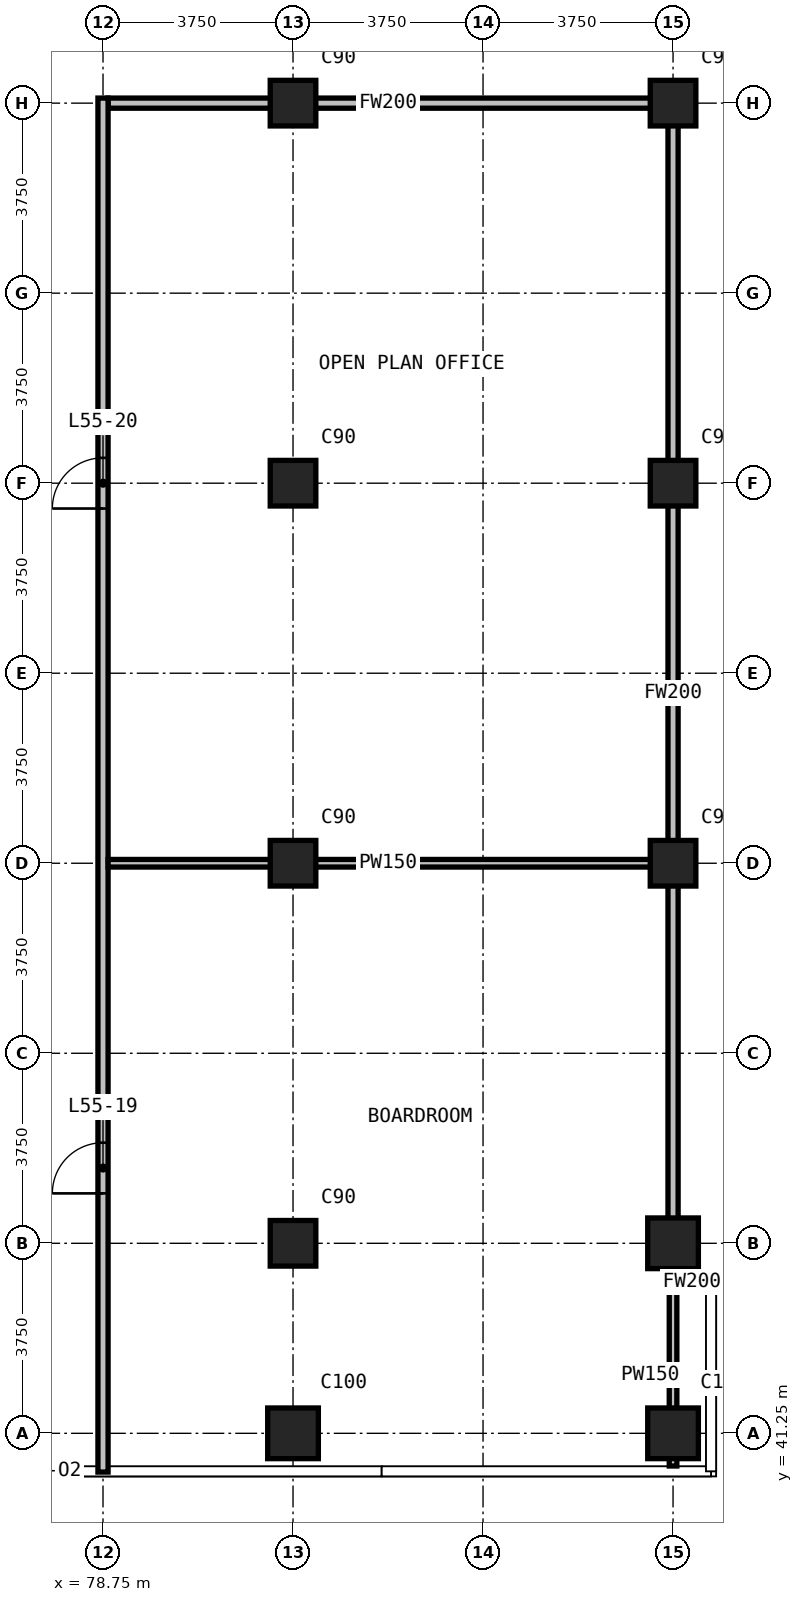
"""IFC4 building model, lengths in metres.
Left out: names, types, materials, properties, quantities, classifications, styles, units other than length and angle.
Written with IfcOpenShell. Run it as: python <this file> out.ifc"""

import sys

from ifc_helpers import new_model, si_unit, direction, frame, frame_2d, origin, origin_2d, place, context, subcontext, project, spatial, rectangle, extrude, element, fill, save


model = new_model("IFC4")
c1 = context("Model", 3, precision=1e-05, world=origin(), true_north=direction((0.0, 1.0)))
c2 = subcontext(c1, "Body", "Model", "MODEL_VIEW")
j1 = project(units=[si_unit("LENGTHUNIT", "METRE"), si_unit("PLANEANGLEUNIT", "RADIAN")], contexts=[c1])
p1 = place(None, origin())
s1 = spatial("IfcSite", under=j1, at=p1, CompositionType="ELEMENT")
p2 = place(p1, origin())
s2 = spatial("IfcBuilding", under=s1, at=p2, CompositionType="ELEMENT")
p3 = place(p2, frame((0.0, 0.0, 213.9)))
s3 = spatial("IfcBuildingStorey", under=s2, at=p3, CompositionType="ELEMENT", Elevation=213.9)
p4 = place(p3, frame((82.5, 41.25, 0.0), z_axis=(0.0, 0.0, 1.0), x_axis=(1.0, 0.0, 0.0)))
e1 = element("IfcColumn", 1, at=p4, inside=s3, PredefinedType="COLUMN", context=c2, shape_type="SweptSolid", body=[
    extrude(rectangle(XDim=1.0, YDim=1.0, at=origin_2d()), origin(), (0.0, 0.0, 1.0), 3.6),
])
for number, where, z_axis, x_axis in (
    (2, (82.5, 45.0, 0.0), (0.0, 0.0, 1.0), (1.0, 0.0, 0.0)),
    (3, (82.5, 52.5, 0.0), (0.0, 0.0, 1.0), (1.0, 0.0, 0.0)),
    (4, (82.5, 60.0, 0.0), (0.0, 0.0, 1.0), (1.0, 0.0, 0.0)),
    (5, (82.5, 67.5, 0.0), (0.0, 0.0, 1.0), (1.0, 0.0, 0.0)),
):
    element("IfcColumn", number, at=place(p3, frame(where, z_axis=z_axis, x_axis=x_axis)), inside=s3, PredefinedType="COLUMN", context=c2, shape_type="SweptSolid", body=[
        extrude(rectangle(XDim=0.9, YDim=0.9, at=origin_2d()), origin(), (0.0, 0.0, 1.0), 3.6),
    ])
for number, where, z_axis, x_axis in (
    (6, (90.0, 41.25, 0.0), (0.0, 0.0, 1.0), (1.0, 0.0, 0.0)),
    (7, (90.0, 45.0, 0.0), (0.0, 0.0, 1.0), (1.0, 0.0, 0.0)),
):
    element("IfcColumn", number, at=place(p3, frame(where, z_axis=z_axis, x_axis=x_axis)), inside=s3, PredefinedType="COLUMN", context=c2, shape_type="SweptSolid", body=[
        extrude(rectangle(XDim=1.0, YDim=1.0, at=origin_2d()), origin(), (0.0, 0.0, 1.0), 3.6),
    ])
for number, where, z_axis, x_axis in (
    (8, (90.0, 52.5, 0.0), (0.0, 0.0, 1.0), (1.0, 0.0, 0.0)),
    (9, (90.0, 60.0, 0.0), (0.0, 0.0, 1.0), (1.0, 0.0, 0.0)),
    (10, (90.0, 67.5, 0.0), (0.0, 0.0, 1.0), (1.0, 0.0, 0.0)),
):
    element("IfcColumn", number, at=place(p3, frame(where, z_axis=z_axis, x_axis=x_axis)), inside=s3, PredefinedType="COLUMN", context=c2, shape_type="SweptSolid", body=[
        extrude(rectangle(XDim=0.9, YDim=0.9, at=origin_2d()), origin(), (0.0, 0.0, 1.0), 3.6),
    ])
p5 = place(p3, frame((90.1, 44.235, 0.0), z_axis=(0.0, 0.0, 1.0), x_axis=(1.0, 0.0, 0.0)))
e11 = element("IfcWall", 11, at=p5, inside=s3, PredefinedType="PARTITIONING", context=c2, shape_type="SweptSolid", body=[
    extrude(rectangle(XDim=0.545, YDim=0.2, at=frame_2d((0.272, 0.0))), origin(), (0.0, 0.0, 1.0), 3.3),
])
p6 = place(p3, frame((78.85, 67.5, 0.0), z_axis=(0.0, 0.0, 1.0), x_axis=(1.0, 0.0, 0.0)))
e12 = element("IfcWall", 12, at=p6, inside=s3, PredefinedType="PARTITIONING", context=c2, shape_type="SweptSolid", body=[
    extrude(rectangle(XDim=11.05, YDim=0.2, at=frame_2d((5.525, 0.0))), origin(), (0.0, 0.0, 1.0), 3.3),
])
p7 = place(p3, frame((78.75, 40.485, 0.0), z_axis=(0.0, 0.0, 1.0), x_axis=(0.0, 1.0, 0.0)))
e13 = element("IfcWall", 13, at=p7, inside=s3, PredefinedType="PARTITIONING", context=c2, shape_type="SweptSolid", body=[
    extrude(rectangle(XDim=27.115, YDim=0.2, at=frame_2d((13.558, 0.0))), origin(), (0.0, 0.0, 1.0), 3.3),
])
p8 = place(p7, frame((5.5, 0.0, 0.0)))
e14 = element("IfcOpeningElement", 14, at=p8, cuts=e13, PredefinedType="OPENING", context=c2, shape_type="SweptSolid", body=[
    extrude(rectangle(XDim=1.0, YDim=2.2, at=frame_2d((0.5, 1.1))), frame((0.0, 0.11, 0.0), z_axis=(0.0, -1.0, 0.0), x_axis=(1.0, 0.0, 0.0)), (0.0, 0.0, 1.0), 0.22),
])
p9 = place(p7, frame((19.015, 0.0, 0.0)))
e15 = element("IfcOpeningElement", 15, at=p9, cuts=e13, PredefinedType="OPENING", context=c2, shape_type="SweptSolid", body=[
    extrude(rectangle(XDim=1.0, YDim=2.2, at=frame_2d((0.5, 1.1))), frame((0.0, 0.11, 0.0), z_axis=(0.0, -1.0, 0.0), x_axis=(1.0, 0.0, 0.0)), (0.0, 0.0, 1.0), 0.22),
])
p10 = place(p3, frame((90.0, 44.135, 0.0), z_axis=(0.0, 0.0, 1.0), x_axis=(0.0, 1.0, 0.0)))
e16 = element("IfcWall", 16, at=p10, inside=s3, PredefinedType="PARTITIONING", context=c2, shape_type="SweptSolid", body=[
    extrude(rectangle(XDim=23.465, YDim=0.2, at=frame_2d((11.732, 0.0))), origin(), (0.0, 0.0, 1.0), 3.3),
])
p11 = place(p3, frame((78.85, 52.5, 0.0), z_axis=(0.0, 0.0, 1.0), x_axis=(1.0, 0.0, 0.0)))
e17 = element("IfcWall", 17, at=p11, inside=s3, PredefinedType="PARTITIONING", context=c2, shape_type="SweptSolid", body=[
    extrude(rectangle(XDim=11.05, YDim=0.15, at=frame_2d((5.525, 0.0))), origin(), (0.0, 0.0, 1.0), 3.3),
])
p12 = place(p3, frame((90.0, 40.605, 0.0), z_axis=(0.0, 0.0, 1.0), x_axis=(0.0, 1.0, 0.0)))
e18 = element("IfcWall", 18, at=p12, inside=s3, PredefinedType="PARTITIONING", context=c2, shape_type="SweptSolid", body=[
    extrude(rectangle(XDim=3.6, YDim=0.15, at=frame_2d((1.8, 0.0))), origin(), (0.0, 0.0, 1.0), 3.3),
])
p13 = place(p8, origin())
e19 = element("IfcDoor", 19, at=p13, inside=s3, OperationType="SINGLE_SWING_LEFT", PredefinedType="DOOR", context=c2, shape_type="SweptSolid", body=[
    extrude(rectangle(XDim=1.0, YDim=2.2, at=frame_2d((0.5, 1.1))), frame((0.0, 0.025, 0.0), z_axis=(0.0, -1.0, 0.0), x_axis=(1.0, 0.0, 0.0)), (0.0, 0.0, 1.0), 0.05),
])
fill(e14, e19)
p14 = place(p9, origin())
e20 = element("IfcDoor", 20, at=p14, inside=s3, OperationType="SINGLE_SWING_LEFT", PredefinedType="DOOR", context=c2, shape_type="SweptSolid", body=[
    extrude(rectangle(XDim=1.0, YDim=2.2, at=frame_2d((0.5, 1.1))), frame((0.0, 0.025, 0.0), z_axis=(0.0, -1.0, 0.0), x_axis=(1.0, 0.0, 0.0)), (0.0, 0.0, 1.0), 0.05),
])
fill(e15, e20)
save(model, sys.argv[1])
